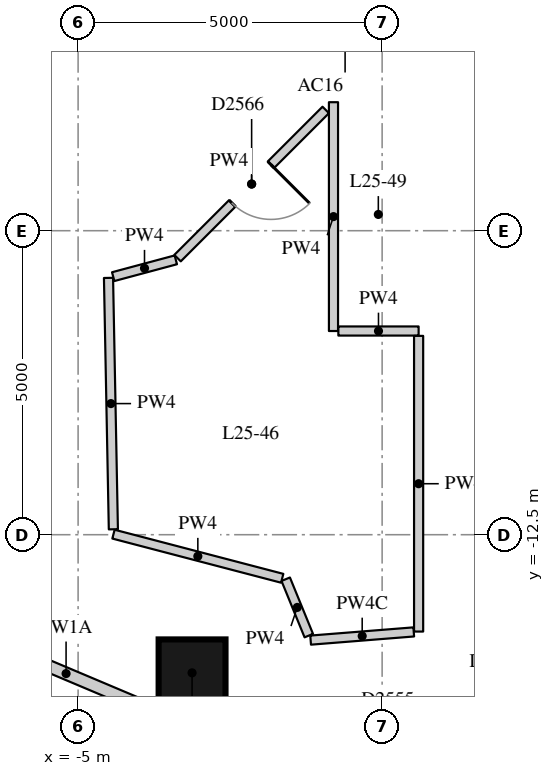
"""IFC4 building model, lengths in metres.
Left out: names, types, materials, properties, quantities, classifications, styles, units other than length and angle.
Written with IfcOpenShell. Run it as: python <this file> out.ifc"""

import sys

from ifc_helpers import new_model, si_unit, direction, frame, frame_2d, origin, origin_2d, place, context, subcontext, project, spatial, rectangle, extrude, element, fill, save


model = new_model("IFC4")
c1 = context("Model", 3, precision=1e-05, world=origin(), true_north=direction((0.0, 1.0)))
c2 = subcontext(c1, "Body", "Model", "MODEL_VIEW")
j1 = project(units=[si_unit("LENGTHUNIT", "METRE"), si_unit("PLANEANGLEUNIT", "RADIAN")], contexts=[c1])
p1 = place(None, origin())
s1 = spatial("IfcSite", under=j1, at=p1, CompositionType="ELEMENT")
p2 = place(p1, origin())
s2 = spatial("IfcBuilding", under=s1, at=p2, CompositionType="ELEMENT")
p3 = place(p2, frame((0.0, 0.0, 92.2)))
s3 = spatial("IfcBuildingStorey", under=s2, at=p3, CompositionType="ELEMENT", Elevation=92.2)
p4 = place(p3, frame((-3.126, -14.772, 0.0), z_axis=(0.0, 0.0, 1.0), x_axis=(1.0, 0.0, 0.0)))
e1 = element("IfcColumn", 1, at=p4, inside=s3, PredefinedType="COLUMN", context=c2, shape_type="SweptSolid", body=[
    extrude(rectangle(XDim=1.1, YDim=1.1, at=origin_2d()), origin(), (0.0, 0.0, 1.0), 3.3),
])
p5 = place(p3, frame((7.158, -15.178, 0.0), z_axis=(0.0, 0.0, 1.0), x_axis=(-0.996871915552, -0.0790340685, 0.0)))
e2 = element("IfcWall", 2, at=p5, inside=s3, PredefinedType="PARTITIONING", context=c2, shape_type="SweptSolid", body=[
    extrude(rectangle(XDim=9.647, YDim=0.2, at=frame_2d((4.824, 0.0))), origin(), (0.0, 0.0, 1.0), 3.02),
])
p6 = place(p5, frame((6.588, 0.0, 0.0)))
e3 = element("IfcOpeningElement", 3, at=p6, cuts=e2, PredefinedType="OPENING", context=c2, shape_type="SweptSolid", body=[
    extrude(rectangle(XDim=1.0, YDim=2.1, at=frame_2d((0.5, 1.05))), frame((0.0, 0.11, 0.0), z_axis=(0.0, -1.0, 0.0), x_axis=(1.0, 0.0, 0.0)), (0.0, 0.0, 1.0), 0.22),
])
p7 = place(p5, frame((4.855, 0.0, 0.0)))
e4 = element("IfcOpeningElement", 4, at=p7, cuts=e2, PredefinedType="OPENING", context=c2, shape_type="SweptSolid", body=[
    extrude(rectangle(XDim=0.9, YDim=2.1, at=frame_2d((0.45, 1.05))), frame((0.0, 0.11, 0.0), z_axis=(0.0, -1.0, 0.0), x_axis=(1.0, 0.0, 0.0)), (0.0, 0.0, 1.0), 0.22),
])
p8 = place(p5, frame((0.22, 0.0, 0.0)))
e5 = element("IfcOpeningElement", 5, at=p8, cuts=e2, PredefinedType="OPENING", context=c2, shape_type="SweptSolid", body=[
    extrude(rectangle(XDim=1.1, YDim=2.1, at=frame_2d((0.55, 1.05))), frame((0.0, 0.11, 0.0), z_axis=(0.0, -1.0, 0.0), x_axis=(1.0, 0.0, 0.0)), (0.0, 0.0, 1.0), 0.22),
])
p9 = place(p3, frame((-2.496, -15.925, 0.0), z_axis=(0.0, 0.0, 1.0), x_axis=(-0.921239287596, 0.388996368864, 0.0)))
e6 = element("IfcWall", 6, at=p9, inside=s3, PredefinedType="PARTITIONING", context=c2, shape_type="SweptSolid", body=[
    extrude(rectangle(XDim=5.866, YDim=0.2, at=frame_2d((2.933, 0.0))), origin(), (0.0, 0.0, 1.0), 2.57),
])
p10 = place(p3, frame((-0.8, -5.386, 0.0), z_axis=(0.0, 0.0, 1.0), x_axis=(0.0, -1.0, 0.0)))
e7 = element("IfcWall", 7, at=p10, inside=s3, PredefinedType="PARTITIONING", context=c2, shape_type="SweptSolid", body=[
    extrude(rectangle(XDim=3.763, YDim=0.15, at=frame_2d((1.882, 0.0))), origin(), (0.0, 0.0, 1.0), 3.02),
])
p11 = place(p3, frame((-0.72, -9.15, 0.0), z_axis=(0.0, 0.0, 1.0), x_axis=(1.0, 0.0, 0.0)))
e8 = element("IfcWall", 8, at=p11, inside=s3, PredefinedType="PARTITIONING", context=c2, shape_type="SweptSolid", body=[
    extrude(rectangle(XDim=1.32, YDim=0.15, at=frame_2d((0.66, 0.0))), origin(), (0.0, 0.0, 1.0), 3.02),
])
p12 = place(p3, frame((0.6, -9.23, 0.0), z_axis=(0.0, 0.0, 1.0), x_axis=(0.0, -1.0, 0.0)))
e9 = element("IfcWall", 9, at=p12, inside=s3, PredefinedType="PARTITIONING", context=c2, shape_type="SweptSolid", body=[
    extrude(rectangle(XDim=4.863, YDim=0.15, at=frame_2d((2.432, 0.0))), origin(), (0.0, 0.0, 1.0), 3.02),
])
p13 = place(p3, frame((0.52, -14.099, 0.0), z_axis=(0.0, 0.0, 1.0), x_axis=(-0.99684577893, -0.079363045745, 0.0)))
e10 = element("IfcWall", 10, at=p13, inside=s3, PredefinedType="PARTITIONING", context=c2, shape_type="SweptSolid", body=[
    extrude(rectangle(XDim=1.701, YDim=0.15, at=frame_2d((0.851, 0.0))), origin(), (0.0, 0.0, 1.0), 2.42),
])
p14 = place(p3, frame((-1.206, -14.16, 0.0), z_axis=(0.0, 0.0, 1.0), x_axis=(-0.378813066595, 0.925473209, 0.0)))
e11 = element("IfcWall", 11, at=p14, inside=s3, PredefinedType="PARTITIONING", context=c2, shape_type="SweptSolid", body=[
    extrude(rectangle(XDim=1.002, YDim=0.15, at=frame_2d((0.501, 0.0))), origin(), (0.0, 0.0, 1.0), 3.02),
])
p15 = place(p3, frame((-1.644, -13.217, 0.0), z_axis=(0.0, 0.0, 1.0), x_axis=(-0.967446197993, 0.253076774891, 0.0)))
e12 = element("IfcWall", 12, at=p15, inside=s3, PredefinedType="PARTITIONING", context=c2, shape_type="SweptSolid", body=[
    extrude(rectangle(XDim=2.868, YDim=0.15, at=frame_2d((1.434, 0.0))), origin(), (0.0, 0.0, 1.0), 3.02),
])
p16 = place(p3, frame((-4.42, -12.411, 0.0), z_axis=(0.0, 0.0, 1.0), x_axis=(-0.01930438501, 0.999813652997, 0.0)))
e13 = element("IfcWall", 13, at=p16, inside=s3, PredefinedType="PARTITIONING", context=c2, shape_type="SweptSolid", body=[
    extrude(rectangle(XDim=4.135, YDim=0.15, at=frame_2d((2.068, 0.0))), origin(), (0.0, 0.0, 1.0), 3.02),
])
p17 = place(p3, frame((-4.423, -8.256, 0.0), z_axis=(0.0, 0.0, 1.0), x_axis=(0.965880568435, 0.258987890683, 0.0)))
e14 = element("IfcWall", 14, at=p17, inside=s3, PredefinedType="PARTITIONING", context=c2, shape_type="SweptSolid", body=[
    extrude(rectangle(XDim=1.066, YDim=0.15, at=frame_2d((0.533, 0.0))), origin(), (0.0, 0.0, 1.0), 3.02),
])
p18 = place(p3, frame((-3.365, -7.951, 0.0), z_axis=(0.0, 0.0, 1.0), x_axis=(0.707106781187, 0.707106781187, 0.0)))
e15 = element("IfcWall", 15, at=p18, inside=s3, PredefinedType="PARTITIONING", context=c2, shape_type="SweptSolid", body=[
    extrude(rectangle(XDim=3.447, YDim=0.15, at=frame_2d((1.723, 0.0))), origin(), (0.0, 0.0, 1.0), 3.02),
])
p19 = place(p18, frame((1.273, 0.0, 0.0)))
e16 = element("IfcOpeningElement", 16, at=p19, cuts=e15, PredefinedType="OPENING", context=c2, shape_type="SweptSolid", body=[
    extrude(rectangle(XDim=0.9, YDim=2.1, at=frame_2d((0.45, 1.05))), frame((0.0, 0.085, 0.0), z_axis=(0.0, -1.0, 0.0), x_axis=(1.0, 0.0, 0.0)), (0.0, 0.0, 1.0), 0.17),
])
p20 = place(p3, frame((-4.073, -3.927, 0.0), z_axis=(0.0, 0.0, 1.0), x_axis=(-0.923860025149, -0.382730523909, 0.0)))
e17 = element("IfcWall", 17, at=p20, inside=s3, PredefinedType="PARTITIONING", context=c2, shape_type="SweptSolid", body=[
    extrude(rectangle(XDim=4.251, YDim=0.1, at=frame_2d((2.125, 0.0))), origin(), (0.0, 0.0, 1.0), 3.02),
])
p21 = place(p19, origin())
e18 = element("IfcDoor", 18, at=p21, inside=s3, OperationType="SINGLE_SWING_LEFT", PredefinedType="DOOR", context=c2, shape_type="SweptSolid", body=[
    extrude(rectangle(XDim=0.9, YDim=2.1, at=frame_2d((0.45, 1.05))), frame((0.0, 0.025, 0.0), z_axis=(0.0, -1.0, 0.0), x_axis=(1.0, 0.0, 0.0)), (0.0, 0.0, 1.0), 0.05),
])
fill(e16, e18)
save(model, sys.argv[1])
